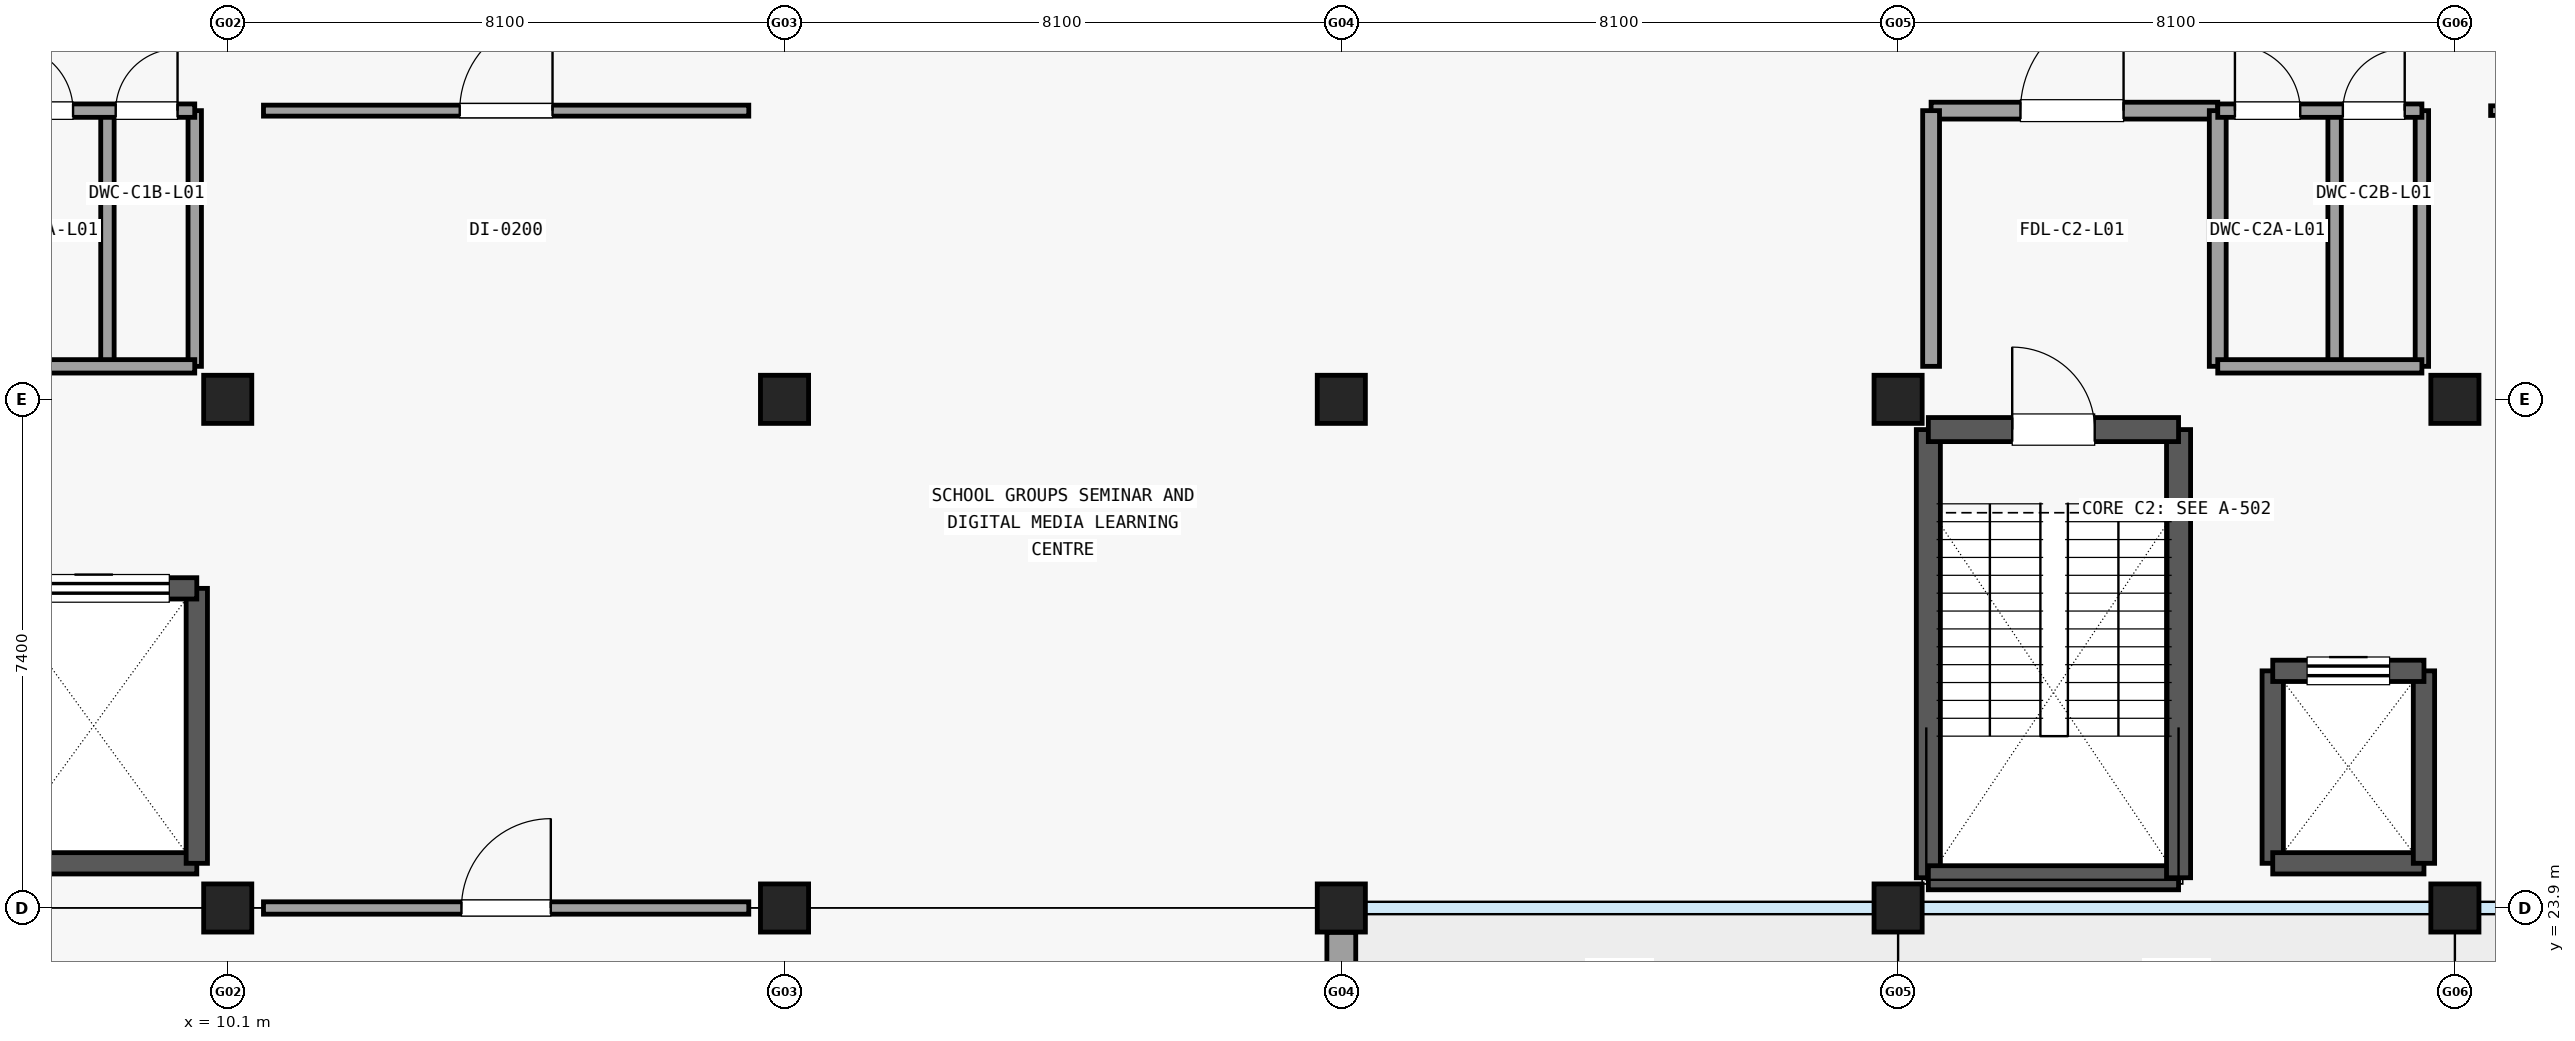
"""IFC4 building model, lengths in metres.
Left out: names, types, materials, properties, quantities, classifications, styles, units other than length and angle.
Written with IfcOpenShell. Run it as: python <this file> out.ifc"""

import sys

from ifc_helpers import new_model, si_unit, direction, frame, frame_2d, origin, origin_2d, place, context, subcontext, project, spatial, rectangle, extrude, element, fill, save


model = new_model("IFC4")
c1 = context("Model", 3, precision=1e-05, world=origin(), true_north=direction((0.0, 1.0)))
c2 = subcontext(c1, "Body", "Model", "MODEL_VIEW")
j1 = project(units=[si_unit("LENGTHUNIT", "METRE"), si_unit("PLANEANGLEUNIT", "RADIAN")], contexts=[c1])
p1 = place(None, origin())
s1 = spatial("IfcSite", under=j1, at=p1, CompositionType="ELEMENT")
p2 = place(p1, origin())
s2 = spatial("IfcBuilding", under=s1, at=p2, CompositionType="ELEMENT")
p3 = place(p2, frame((0.0, 0.0, 5.4)))
s3 = spatial("IfcBuildingStorey", under=s2, at=p3, CompositionType="ELEMENT", Elevation=5.4)
for number, where, z_axis, x_axis in (
    (1, (10.1, 23.9, 0.0), (0.0, 0.0, 1.0), (1.0, 0.0, 0.0)),
    (2, (10.1, 31.3, 0.0), (0.0, 0.0, 1.0), (1.0, 0.0, 0.0)),
    (3, (18.2, 23.9, 0.0), (0.0, 0.0, 1.0), (1.0, 0.0, 0.0)),
    (4, (18.2, 31.3, 0.0), (0.0, 0.0, 1.0), (1.0, 0.0, 0.0)),
    (5, (26.3, 23.9, 0.0), (0.0, 0.0, 1.0), (1.0, 0.0, 0.0)),
    (6, (26.3, 31.3, 0.0), (0.0, 0.0, 1.0), (1.0, 0.0, 0.0)),
    (7, (34.4, 23.9, 0.0), (0.0, 0.0, 1.0), (1.0, 0.0, 0.0)),
    (8, (34.4, 31.3, 0.0), (0.0, 0.0, 1.0), (1.0, 0.0, 0.0)),
    (9, (42.5, 23.9, 0.0), (0.0, 0.0, 1.0), (1.0, 0.0, 0.0)),
    (10, (42.5, 31.3, 0.0), (0.0, 0.0, 1.0), (1.0, 0.0, 0.0)),
):
    element("IfcColumn", number, at=place(p3, frame(where, z_axis=z_axis, x_axis=x_axis)), inside=s3, PredefinedType="COLUMN", context=c2, shape_type="SweptSolid", body=[
        extrude(rectangle(XDim=0.7, YDim=0.7, at=origin_2d()), origin(), (0.0, 0.0, 1.0), 4.56),
    ])
p4 = place(p3, frame((26.3, 23.546, 0.0), z_axis=(0.0, 0.0, 1.0), x_axis=(0.0, -1.0, 0.0)))
e11 = element("IfcWall", 11, at=p4, inside=s3, PredefinedType="SOLIDWALL", context=c2, shape_type="SweptSolid", body=[
    extrude(rectangle(XDim=6.692, YDim=0.42, at=frame_2d((3.346, 0.0))), origin(), (0.0, 0.0, 1.0), 3.795),
])
p5 = place(p4, frame((2.386, 0.0, 0.65)))
e12 = element("IfcOpeningElement", 12, at=p5, cuts=e11, PredefinedType="OPENING", context=c2, shape_type="SweptSolid", body=[
    extrude(rectangle(XDim=0.72, YDim=2.65, at=frame_2d((0.36, 1.325))), frame((0.0, 0.22, 0.0), z_axis=(0.0, -1.0, 0.0), x_axis=(1.0, 0.0, 0.0)), (0.0, 0.0, 1.0), 0.44),
])
p6 = place(p4, frame((3.586, 0.0, 0.65)))
e13 = element("IfcOpeningElement", 13, at=p6, cuts=e11, PredefinedType="OPENING", context=c2, shape_type="SweptSolid", body=[
    extrude(rectangle(XDim=0.72, YDim=2.65, at=frame_2d((0.36, 1.325))), frame((0.0, 0.22, 0.0), z_axis=(0.0, -1.0, 0.0), x_axis=(1.0, 0.0, 0.0)), (0.0, 0.0, 1.0), 0.44),
])
p7 = place(p3, frame((6.65, 24.55, 0.0), z_axis=(0.0, 0.0, 1.0), x_axis=(1.0, 0.0, 0.0)))
e14 = element("IfcWall", 14, at=p7, inside=s3, PredefinedType="SHEAR", context=c2, shape_type="SweptSolid", body=[
    extrude(rectangle(XDim=3.0, YDim=0.31, at=frame_2d((1.5, 0.0))), origin(), (0.0, 0.0, 1.0), 4.555),
])
p8 = place(p3, frame((9.65, 24.55, 0.0), z_axis=(0.0, 0.0, 1.0), x_axis=(0.0, 1.0, 0.0)))
e15 = element("IfcWall", 15, at=p8, inside=s3, PredefinedType="SHEAR", context=c2, shape_type="SweptSolid", body=[
    extrude(rectangle(XDim=4.0, YDim=0.31, at=frame_2d((2.0, 0.0))), origin(), (0.0, 0.0, 1.0), 4.555),
])
p9 = place(p3, frame((6.65, 28.55, 0.0), z_axis=(0.0, 0.0, 1.0), x_axis=(1.0, 0.0, 0.0)))
e16 = element("IfcWall", 16, at=p9, inside=s3, PredefinedType="SHEAR", context=c2, shape_type="SweptSolid", body=[
    extrude(rectangle(XDim=3.0, YDim=0.31, at=frame_2d((1.5, 0.0))), origin(), (0.0, 0.0, 1.0), 4.555),
])
p10 = place(p9, frame((0.4, 0.0, 0.0)))
e17 = element("IfcOpeningElement", 17, at=p10, cuts=e16, PredefinedType="OPENING", context=c2, shape_type="SweptSolid", body=[
    extrude(rectangle(XDim=2.2, YDim=2.55, at=frame_2d((1.1, 1.275))), frame((0.0, 0.165, 0.0), z_axis=(0.0, -1.0, 0.0), x_axis=(1.0, 0.0, 0.0)), (0.0, 0.0, 1.0), 0.33),
])
for number, where, z_axis, x_axis in (
    (18, (8.35, 31.78, 0.0), (0.0, 0.0, 1.0), (0.0, 1.0, 0.0)),
    (19, (9.62, 31.78, 0.0), (0.0, 0.0, 1.0), (0.0, 1.0, 0.0)),
):
    element("IfcWall", number, at=place(p3, frame(where, z_axis=z_axis, x_axis=x_axis)), inside=s3, PredefinedType="PARTITIONING", context=c2, shape_type="SweptSolid", body=[
        extrude(rectangle(XDim=3.72, YDim=0.195, at=frame_2d((1.86, 0.0))), origin(), (0.0, 0.0, 1.0), 3.8),
    ])
p11 = place(p3, frame((6.65, 31.78, 0.0), z_axis=(0.0, 0.0, 1.0), x_axis=(1.0, 0.0, 0.0)))
e20 = element("IfcWall", 20, at=p11, inside=s3, PredefinedType="PARTITIONING", context=c2, shape_type="SweptSolid", body=[
    extrude(rectangle(XDim=2.97, YDim=0.195, at=frame_2d((1.485, 0.0))), origin(), (0.0, 0.0, 1.0), 3.8),
])
p12 = place(p3, frame((6.65, 35.5, 0.0), z_axis=(0.0, 0.0, 1.0), x_axis=(1.0, 0.0, 0.0)))
e21 = element("IfcWall", 21, at=p12, inside=s3, PredefinedType="PARTITIONING", context=c2, shape_type="SweptSolid", body=[
    extrude(rectangle(XDim=2.97, YDim=0.195, at=frame_2d((1.485, 0.0))), origin(), (0.0, 0.0, 1.0), 3.8),
])
p13 = place(p12, frame((0.25, 0.0, 0.0)))
e22 = element("IfcOpeningElement", 22, at=p13, cuts=e21, PredefinedType="OPENING", context=c2, shape_type="SweptSolid", body=[
    extrude(rectangle(XDim=0.95, YDim=2.1, at=frame_2d((0.475, 1.05))), frame((0.0, 0.107, 0.0), z_axis=(0.0, -1.0, 0.0), x_axis=(1.0, 0.0, 0.0)), (0.0, 0.0, 1.0), 0.215),
])
p14 = place(p12, frame((1.82, 0.0, 0.0)))
e23 = element("IfcOpeningElement", 23, at=p14, cuts=e21, PredefinedType="OPENING", context=c2, shape_type="SweptSolid", body=[
    extrude(rectangle(XDim=0.9, YDim=2.1, at=frame_2d((0.45, 1.05))), frame((0.0, 0.107, 0.0), z_axis=(0.0, -1.0, 0.0), x_axis=(1.0, 0.0, 0.0)), (0.0, 0.0, 1.0), 0.215),
])
p15 = place(p3, frame((34.84, 24.34, 0.0), z_axis=(0.0, 0.0, 1.0), x_axis=(0.0, 1.0, 0.0)))
e24 = element("IfcWall", 24, at=p15, inside=s3, PredefinedType="SHEAR", context=c2, shape_type="SweptSolid", body=[
    extrude(rectangle(XDim=6.52, YDim=0.35, at=frame_2d((3.26, 0.0))), origin(), (0.0, 0.0, 1.0), 4.555),
])
p16 = place(p3, frame((34.84, 24.34, 0.0), z_axis=(0.0, 0.0, 1.0), x_axis=(1.0, 0.0, 0.0)))
e25 = element("IfcWall", 25, at=p16, inside=s3, PredefinedType="SHEAR", context=c2, shape_type="SweptSolid", body=[
    extrude(rectangle(XDim=3.64, YDim=0.35, at=frame_2d((1.82, 0.0))), origin(), (0.0, 0.0, 1.0), 4.555),
])
p17 = place(p3, frame((38.48, 24.34, 0.0), z_axis=(0.0, 0.0, 1.0), x_axis=(0.0, 1.0, 0.0)))
e26 = element("IfcWall", 26, at=p17, inside=s3, PredefinedType="SHEAR", context=c2, shape_type="SweptSolid", body=[
    extrude(rectangle(XDim=6.52, YDim=0.35, at=frame_2d((3.26, 0.0))), origin(), (0.0, 0.0, 1.0), 4.555),
])
p18 = place(p3, frame((34.84, 30.86, 0.0), z_axis=(0.0, 0.0, 1.0), x_axis=(1.0, 0.0, 0.0)))
e27 = element("IfcWall", 27, at=p18, inside=s3, PredefinedType="SHEAR", context=c2, shape_type="SweptSolid", body=[
    extrude(rectangle(XDim=3.64, YDim=0.35, at=frame_2d((1.82, 0.0))), origin(), (0.0, 0.0, 1.0), 4.555),
])
p19 = place(p18, frame((1.22, 0.0, 0.0)))
e28 = element("IfcOpeningElement", 28, at=p19, cuts=e27, PredefinedType="OPENING", context=c2, shape_type="SweptSolid", body=[
    extrude(rectangle(XDim=1.2, YDim=2.15, at=frame_2d((0.6, 1.075))), frame((0.0, 0.185, 0.0), z_axis=(0.0, -1.0, 0.0), x_axis=(1.0, 0.0, 0.0)), (0.0, 0.0, 1.0), 0.37),
])
p20 = place(p3, frame((39.85, 24.55, 0.0), z_axis=(0.0, 0.0, 1.0), x_axis=(0.0, 1.0, 0.0)))
e29 = element("IfcWall", 29, at=p20, inside=s3, PredefinedType="SHEAR", context=c2, shape_type="SweptSolid", body=[
    extrude(rectangle(XDim=2.8, YDim=0.31, at=frame_2d((1.4, 0.0))), origin(), (0.0, 0.0, 1.0), 4.555),
])
p21 = place(p3, frame((39.85, 24.55, 0.0), z_axis=(0.0, 0.0, 1.0), x_axis=(1.0, 0.0, 0.0)))
e30 = element("IfcWall", 30, at=p21, inside=s3, PredefinedType="SHEAR", context=c2, shape_type="SweptSolid", body=[
    extrude(rectangle(XDim=2.2, YDim=0.31, at=frame_2d((1.1, 0.0))), origin(), (0.0, 0.0, 1.0), 4.555),
])
p22 = place(p3, frame((42.05, 24.55, 0.0), z_axis=(0.0, 0.0, 1.0), x_axis=(0.0, 1.0, 0.0)))
e31 = element("IfcWall", 31, at=p22, inside=s3, PredefinedType="SHEAR", context=c2, shape_type="SweptSolid", body=[
    extrude(rectangle(XDim=2.8, YDim=0.31, at=frame_2d((1.4, 0.0))), origin(), (0.0, 0.0, 1.0), 4.555),
])
p23 = place(p3, frame((39.85, 27.35, 0.0), z_axis=(0.0, 0.0, 1.0), x_axis=(1.0, 0.0, 0.0)))
e32 = element("IfcWall", 32, at=p23, inside=s3, PredefinedType="SHEAR", context=c2, shape_type="SweptSolid", body=[
    extrude(rectangle(XDim=2.2, YDim=0.31, at=frame_2d((1.1, 0.0))), origin(), (0.0, 0.0, 1.0), 4.555),
])
p24 = place(p23, frame((0.5, 0.0, 0.0)))
e33 = element("IfcOpeningElement", 33, at=p24, cuts=e32, PredefinedType="OPENING", context=c2, shape_type="SweptSolid", body=[
    extrude(rectangle(XDim=1.2, YDim=2.15, at=frame_2d((0.6, 1.075))), frame((0.0, 0.165, 0.0), z_axis=(0.0, -1.0, 0.0), x_axis=(1.0, 0.0, 0.0)), (0.0, 0.0, 1.0), 0.33),
])
p25 = place(p3, frame((34.88, 35.5, 0.0), z_axis=(0.0, 0.0, 1.0), x_axis=(1.0, 0.0, 0.0)))
e34 = element("IfcWall", 34, at=p25, inside=s3, PredefinedType="PARTITIONING", context=c2, shape_type="SweptSolid", body=[
    extrude(rectangle(XDim=4.17, YDim=0.245, at=frame_2d((2.085, 0.0))), origin(), (0.0, 0.0, 1.0), 3.8),
])
p26 = place(p25, frame((1.3, 0.0, 0.0)))
e35 = element("IfcOpeningElement", 35, at=p26, cuts=e34, PredefinedType="OPENING", context=c2, shape_type="SweptSolid", body=[
    extrude(rectangle(XDim=1.5, YDim=2.15, at=frame_2d((0.75, 1.075))), frame((0.0, 0.133, 0.0), z_axis=(0.0, -1.0, 0.0), x_axis=(1.0, 0.0, 0.0)), (0.0, 0.0, 1.0), 0.265),
])
for number, where, z_axis, x_axis in (
    (36, (34.88, 31.78, 0.0), (0.0, 0.0, 1.0), (0.0, 1.0, 0.0)),
    (37, (39.05, 31.78, 0.0), (0.0, 0.0, 1.0), (0.0, 1.0, 0.0)),
):
    element("IfcWall", number, at=place(p3, frame(where, z_axis=z_axis, x_axis=x_axis)), inside=s3, PredefinedType="PARTITIONING", context=c2, shape_type="SweptSolid", body=[
        extrude(rectangle(XDim=3.72, YDim=0.245, at=frame_2d((1.86, 0.0))), origin(), (0.0, 0.0, 1.0), 3.8),
    ])
for number, where, z_axis, x_axis in (
    (38, (40.75, 31.78, 0.0), (0.0, 0.0, 1.0), (0.0, 1.0, 0.0)),
    (39, (42.02, 31.78, 0.0), (0.0, 0.0, 1.0), (0.0, 1.0, 0.0)),
):
    element("IfcWall", number, at=place(p3, frame(where, z_axis=z_axis, x_axis=x_axis)), inside=s3, PredefinedType="PARTITIONING", context=c2, shape_type="SweptSolid", body=[
        extrude(rectangle(XDim=3.72, YDim=0.195, at=frame_2d((1.86, 0.0))), origin(), (0.0, 0.0, 1.0), 3.8),
    ])
p27 = place(p3, frame((39.05, 31.78, 0.0), z_axis=(0.0, 0.0, 1.0), x_axis=(1.0, 0.0, 0.0)))
e40 = element("IfcWall", 40, at=p27, inside=s3, PredefinedType="PARTITIONING", context=c2, shape_type="SweptSolid", body=[
    extrude(rectangle(XDim=2.97, YDim=0.195, at=frame_2d((1.485, 0.0))), origin(), (0.0, 0.0, 1.0), 3.8),
])
p28 = place(p3, frame((39.05, 35.5, 0.0), z_axis=(0.0, 0.0, 1.0), x_axis=(1.0, 0.0, 0.0)))
e41 = element("IfcWall", 41, at=p28, inside=s3, PredefinedType="PARTITIONING", context=c2, shape_type="SweptSolid", body=[
    extrude(rectangle(XDim=2.97, YDim=0.195, at=frame_2d((1.485, 0.0))), origin(), (0.0, 0.0, 1.0), 3.8),
])
p29 = place(p28, frame((0.25, 0.0, 0.0)))
e42 = element("IfcOpeningElement", 42, at=p29, cuts=e41, PredefinedType="OPENING", context=c2, shape_type="SweptSolid", body=[
    extrude(rectangle(XDim=0.95, YDim=2.1, at=frame_2d((0.475, 1.05))), frame((0.0, 0.107, 0.0), z_axis=(0.0, -1.0, 0.0), x_axis=(1.0, 0.0, 0.0)), (0.0, 0.0, 1.0), 0.215),
])
p30 = place(p28, frame((1.82, 0.0, 0.0)))
e43 = element("IfcOpeningElement", 43, at=p30, cuts=e41, PredefinedType="OPENING", context=c2, shape_type="SweptSolid", body=[
    extrude(rectangle(XDim=0.9, YDim=2.1, at=frame_2d((0.45, 1.05))), frame((0.0, 0.107, 0.0), z_axis=(0.0, -1.0, 0.0), x_axis=(1.0, 0.0, 0.0)), (0.0, 0.0, 1.0), 0.215),
])
p31 = place(p3, frame((10.62, 23.9, 0.0), z_axis=(0.0, 0.0, 1.0), x_axis=(1.0, 0.0, 0.0)))
e44 = element("IfcWall", 44, at=p31, inside=s3, PredefinedType="PARTITIONING", context=c2, shape_type="SweptSolid", body=[
    extrude(rectangle(XDim=7.06, YDim=0.18, at=frame_2d((3.53, 0.0))), origin(), (0.0, 0.0, 1.0), 3.8),
])
p32 = place(p31, frame((2.88, 0.0, 0.0)))
e45 = element("IfcOpeningElement", 45, at=p32, cuts=e44, PredefinedType="OPENING", context=c2, shape_type="SweptSolid", body=[
    extrude(rectangle(XDim=1.3, YDim=2.2, at=frame_2d((0.65, 1.1))), frame((0.0, 0.1, 0.0), z_axis=(0.0, -1.0, 0.0), x_axis=(1.0, 0.0, 0.0)), (0.0, 0.0, 1.0), 0.2),
])
p33 = place(p3, frame((10.62, 35.5, 0.0), z_axis=(0.0, 0.0, 1.0), x_axis=(1.0, 0.0, 0.0)))
e46 = element("IfcWall", 46, at=p33, inside=s3, PredefinedType="PARTITIONING", context=c2, shape_type="SweptSolid", body=[
    extrude(rectangle(XDim=7.06, YDim=0.16, at=frame_2d((3.53, 0.0))), origin(), (0.0, 0.0, 1.0), 3.8),
])
p34 = place(p33, frame((2.855, 0.0, 0.0)))
e47 = element("IfcOpeningElement", 47, at=p34, cuts=e46, PredefinedType="OPENING", context=c2, shape_type="SweptSolid", body=[
    extrude(rectangle(XDim=1.35, YDim=2.2, at=frame_2d((0.675, 1.1))), frame((0.0, 0.09, 0.0), z_axis=(0.0, -1.0, 0.0), x_axis=(1.0, 0.0, 0.0)), (0.0, 0.0, 1.0), 0.18),
])
p35 = place(p3, frame((43.02, 35.5, 0.0), z_axis=(0.0, 0.0, 1.0), x_axis=(1.0, 0.0, 0.0)))
e48 = element("IfcWall", 48, at=p35, inside=s3, PredefinedType="PARTITIONING", context=c2, shape_type="SweptSolid", body=[
    extrude(rectangle(XDim=7.06, YDim=0.14, at=frame_2d((3.53, 0.0))), origin(), (0.0, 0.0, 1.0), 3.8),
])
p36 = place(p35, frame((2.805, 0.0, 0.0)))
e49 = element("IfcOpeningElement", 49, at=p36, cuts=e48, PredefinedType="OPENING", context=c2, shape_type="SweptSolid", body=[
    extrude(rectangle(XDim=1.45, YDim=2.2, at=frame_2d((0.725, 1.1))), frame((0.0, 0.08, 0.0), z_axis=(0.0, -1.0, 0.0), x_axis=(1.0, 0.0, 0.0)), (0.0, 0.0, 1.0), 0.16),
])
p37 = place(p10, origin())
e50 = element("IfcDoor", 50, at=p37, inside=s3, OperationType="SLIDING_TO_LEFT", PredefinedType="DOOR", context=c2, shape_type="SweptSolid", body=[
    extrude(rectangle(XDim=2.2, YDim=2.55, at=frame_2d((1.1, 1.275))), frame((0.0, 0.025, 0.0), z_axis=(0.0, -1.0, 0.0), x_axis=(1.0, 0.0, 0.0)), (0.0, 0.0, 1.0), 0.05),
])
fill(e17, e50)
p38 = place(p13, origin())
e51 = element("IfcDoor", 51, at=p38, inside=s3, OperationType="SINGLE_SWING_LEFT", PredefinedType="DOOR", context=c2, shape_type="SweptSolid", body=[
    extrude(rectangle(XDim=0.95, YDim=2.1, at=frame_2d((0.475, 1.05))), frame((0.0, 0.025, 0.0), z_axis=(0.0, -1.0, 0.0), x_axis=(1.0, 0.0, 0.0)), (0.0, 0.0, 1.0), 0.05),
])
fill(e22, e51)
p39 = place(p14, origin())
e52 = element("IfcDoor", 52, at=p39, inside=s3, OperationType="SINGLE_SWING_RIGHT", PredefinedType="DOOR", context=c2, shape_type="SweptSolid", body=[
    extrude(rectangle(XDim=0.9, YDim=2.1, at=frame_2d((0.45, 1.05))), frame((0.0, 0.025, 0.0), z_axis=(0.0, -1.0, 0.0), x_axis=(1.0, 0.0, 0.0)), (0.0, 0.0, 1.0), 0.05),
])
fill(e23, e52)
p40 = place(p19, origin())
e53 = element("IfcDoor", 53, at=p40, inside=s3, OperationType="SINGLE_SWING_LEFT", PredefinedType="DOOR", context=c2, shape_type="SweptSolid", body=[
    extrude(rectangle(XDim=1.2, YDim=2.15, at=frame_2d((0.6, 1.075))), frame((0.0, 0.025, 0.0), z_axis=(0.0, -1.0, 0.0), x_axis=(1.0, 0.0, 0.0)), (0.0, 0.0, 1.0), 0.05),
])
fill(e28, e53)
p41 = place(p24, origin())
e54 = element("IfcDoor", 54, at=p41, inside=s3, OperationType="SLIDING_TO_LEFT", PredefinedType="DOOR", context=c2, shape_type="SweptSolid", body=[
    extrude(rectangle(XDim=1.2, YDim=2.15, at=frame_2d((0.6, 1.075))), frame((0.0, 0.025, 0.0), z_axis=(0.0, -1.0, 0.0), x_axis=(1.0, 0.0, 0.0)), (0.0, 0.0, 1.0), 0.05),
])
fill(e33, e54)
p42 = place(p26, origin())
e55 = element("IfcDoor", 55, at=p42, inside=s3, OperationType="SINGLE_SWING_RIGHT", PredefinedType="DOOR", context=c2, shape_type="SweptSolid", body=[
    extrude(rectangle(XDim=1.5, YDim=2.15, at=frame_2d((0.75, 1.075))), frame((0.0, 0.025, 0.0), z_axis=(0.0, -1.0, 0.0), x_axis=(1.0, 0.0, 0.0)), (0.0, 0.0, 1.0), 0.05),
])
fill(e35, e55)
p43 = place(p29, origin())
e56 = element("IfcDoor", 56, at=p43, inside=s3, OperationType="SINGLE_SWING_LEFT", PredefinedType="DOOR", context=c2, shape_type="SweptSolid", body=[
    extrude(rectangle(XDim=0.95, YDim=2.1, at=frame_2d((0.475, 1.05))), frame((0.0, 0.025, 0.0), z_axis=(0.0, -1.0, 0.0), x_axis=(1.0, 0.0, 0.0)), (0.0, 0.0, 1.0), 0.05),
])
fill(e42, e56)
p44 = place(p30, origin())
e57 = element("IfcDoor", 57, at=p44, inside=s3, OperationType="SINGLE_SWING_RIGHT", PredefinedType="DOOR", context=c2, shape_type="SweptSolid", body=[
    extrude(rectangle(XDim=0.9, YDim=2.1, at=frame_2d((0.45, 1.05))), frame((0.0, 0.025, 0.0), z_axis=(0.0, -1.0, 0.0), x_axis=(1.0, 0.0, 0.0)), (0.0, 0.0, 1.0), 0.05),
])
fill(e43, e57)
p45 = place(p32, origin())
e58 = element("IfcDoor", 58, at=p45, inside=s3, OperationType="SINGLE_SWING_RIGHT", PredefinedType="DOOR", context=c2, shape_type="SweptSolid", body=[
    extrude(rectangle(XDim=1.3, YDim=2.2, at=frame_2d((0.65, 1.1))), frame((0.0, 0.025, 0.0), z_axis=(0.0, -1.0, 0.0), x_axis=(1.0, 0.0, 0.0)), (0.0, 0.0, 1.0), 0.05),
])
fill(e45, e58)
p46 = place(p34, origin())
e59 = element("IfcDoor", 59, at=p46, inside=s3, OperationType="SINGLE_SWING_RIGHT", PredefinedType="DOOR", context=c2, shape_type="SweptSolid", body=[
    extrude(rectangle(XDim=1.35, YDim=2.2, at=frame_2d((0.675, 1.1))), frame((0.0, 0.025, 0.0), z_axis=(0.0, -1.0, 0.0), x_axis=(1.0, 0.0, 0.0)), (0.0, 0.0, 1.0), 0.05),
])
fill(e47, e59)
save(model, sys.argv[1])
